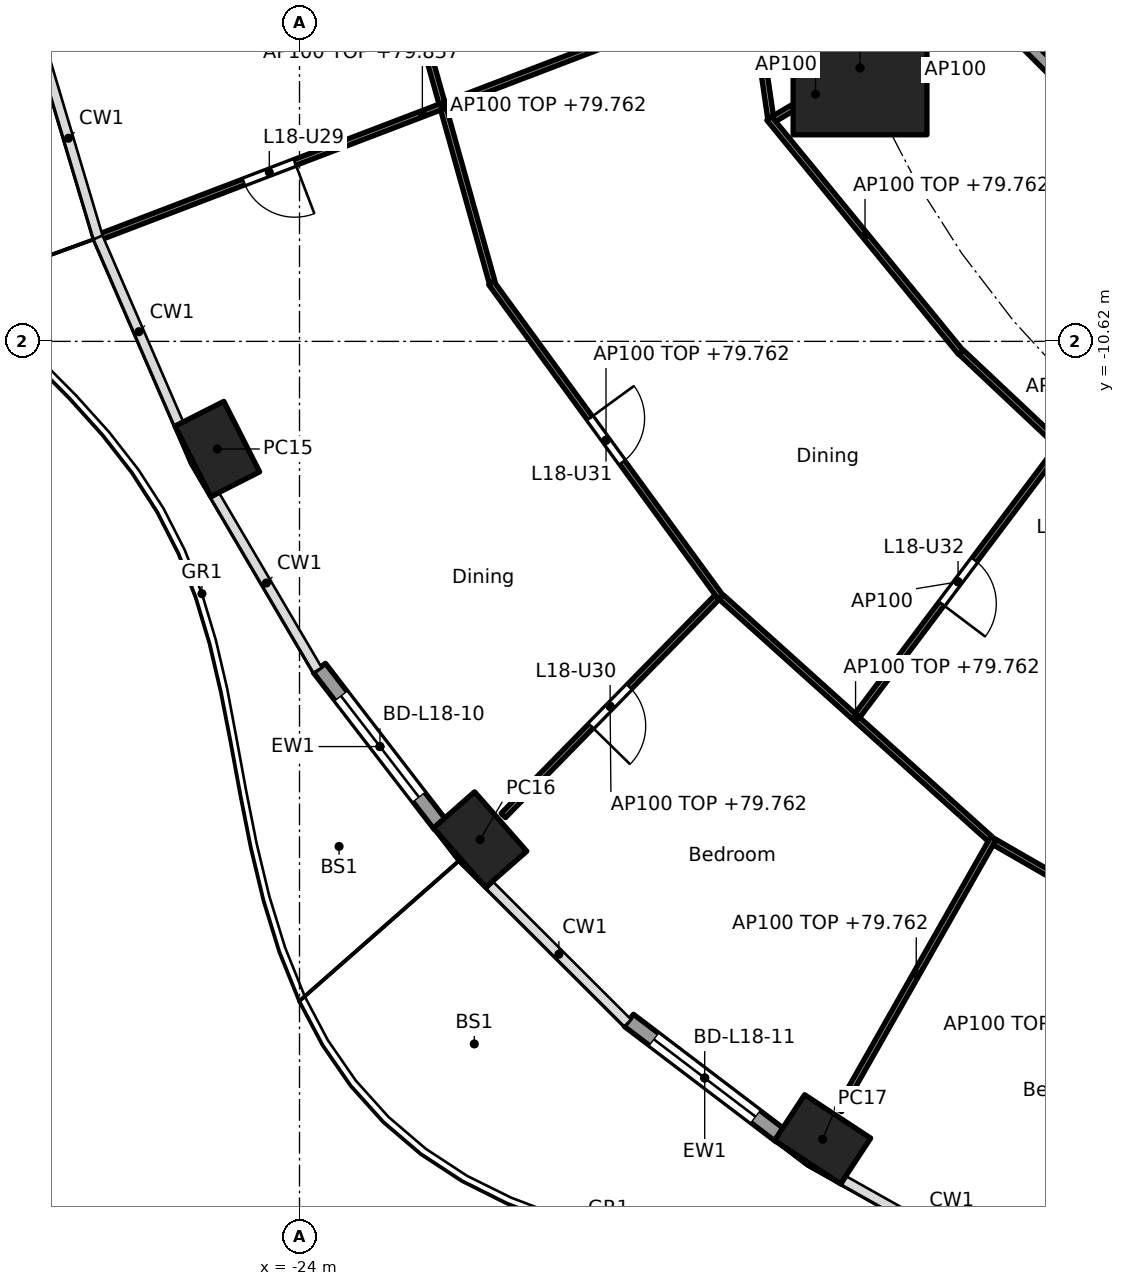
"""IFC4 building model, lengths in metres.
Left out: names, types, materials, properties, quantities, classifications, styles, units other than length and angle.
Written with IfcOpenShell. Run it as: python <this file> out.ifc"""

import sys

from ifc_helpers import new_model, si_unit, direction, frame, frame_2d, origin, origin_2d, place, context, subcontext, project, spatial, rectangle, hollow_rectangle, extrude, element, fill, save


model = new_model("IFC4")
c1 = context("Model", 3, precision=1e-05, world=origin(), true_north=direction((0.0, 1.0)))
c2 = subcontext(c1, "Body", "Model", "MODEL_VIEW")
j1 = project(units=[si_unit("LENGTHUNIT", "METRE"), si_unit("PLANEANGLEUNIT", "RADIAN")], contexts=[c1])
p1 = place(None, origin())
s1 = spatial("IfcSite", under=j1, at=p1, CompositionType="ELEMENT")
p2 = place(p1, origin())
s2 = spatial("IfcBuilding", under=s1, at=p2, CompositionType="ELEMENT")
p3 = place(p2, frame((0.0, 0.0, 77.0)))
s3 = spatial("IfcBuildingStorey", under=s2, at=p3, CompositionType="ELEMENT", Elevation=77.0)
for number, where, z_axis, x_axis in (
    (1, (-25.352, -12.39, 0.0), (0.0, 0.0, 1.0), (0.452, -0.892, 0.0)),
    (2, (-21.03, -18.813, 0.0), (0.0, 0.0, 1.0), (0.66, -0.751, 0.0)),
    (3, (-15.397, -23.742, 0.0), (0.0, 0.0, 1.0), (0.836, -0.549, 0.0)),
):
    element("IfcColumn", number, at=place(p3, frame(where, z_axis=z_axis, x_axis=x_axis)), inside=s3, PredefinedType="COLUMN", context=c2, shape_type="SweptSolid", body=[
        extrude(hollow_rectangle(XDim=1.3, YDim=0.9, WallThickness=0.045, at=origin_2d()), origin(), (0.0, 0.0, 1.0), 3.7),
    ])
p4 = place(p3, frame((-14.782, -6.123, 0.0), z_axis=(0.0, 0.0, 1.0), x_axis=(1.0, 0.0, 0.0)))
e4 = element("IfcColumn", 4, at=p4, inside=s3, PredefinedType="COLUMN", context=c2, shape_type="SweptSolid", body=[
    extrude(rectangle(XDim=2.2, YDim=2.2, at=origin_2d()), origin(), (0.0, 0.0, 1.0), 3.7),
])
p5 = place(p3, frame((-21.681, -18.576, 0.0), z_axis=(0.0, 0.0, 1.0), x_axis=(-0.61041202934, 0.792084057684, 0.0)))
e5 = element("IfcWall", 5, at=p5, inside=s3, PredefinedType="SOLIDWALL", context=c2, shape_type="SweptSolid", body=[
    extrude(rectangle(XDim=3.263, YDim=0.25, at=frame_2d((1.631, 0.0))), origin(), (0.0, 0.0, 1.0), 3.44),
])
p6 = place(p5, frame((0.582, 0.0, 0.0)))
e6 = element("IfcOpeningElement", 6, at=p6, cuts=e5, PredefinedType="OPENING", context=c2, shape_type="SweptSolid", body=[
    extrude(rectangle(XDim=2.1, YDim=2.4, at=frame_2d((1.05, 1.2))), frame((0.0, 0.135, 0.0), z_axis=(0.0, -1.0, 0.0), x_axis=(1.0, 0.0, 0.0)), (0.0, 0.0, 1.0), 0.27),
])
p7 = place(p3, frame((-16.089, -23.682, 0.0), z_axis=(0.0, 0.0, 1.0), x_axis=(-0.796037575978, 0.605247203736, 0.0)))
e7 = element("IfcWall", 7, at=p7, inside=s3, PredefinedType="SOLIDWALL", context=c2, shape_type="SweptSolid", body=[
    extrude(rectangle(XDim=3.134, YDim=0.25, at=frame_2d((1.567, 0.0))), origin(), (0.0, 0.0, 1.0), 3.44),
])
p8 = place(p7, frame((0.517, 0.0, 0.0)))
e8 = element("IfcOpeningElement", 8, at=p8, cuts=e7, PredefinedType="OPENING", context=c2, shape_type="SweptSolid", body=[
    extrude(rectangle(XDim=2.1, YDim=2.4, at=frame_2d((1.05, 1.2))), frame((0.0, 0.135, 0.0), z_axis=(0.0, -1.0, 0.0), x_axis=(1.0, 0.0, 0.0)), (0.0, 0.0, 1.0), 0.27),
])
p9 = place(p3, frame((-12.635, -5.134, 0.0), z_axis=(0.0, 0.0, 1.0), x_axis=(0.707106781187, -0.707106781187, 0.0)))
e9 = element("IfcWall", 9, at=p9, inside=s3, PredefinedType="PARTITIONING", context=c2, shape_type="SweptSolid", body=[
    extrude(rectangle(XDim=10.609, YDim=0.2, at=frame_2d((5.305, 0.0))), origin(), (0.0, 0.0, 1.0), 3.44),
])
p10 = place(p3, frame((-16.874, -2.677, 0.0), z_axis=(0.0, 0.0, 1.0), x_axis=(0.144260658133, -0.989539722555, 0.0)))
e10 = element("IfcWall", 10, at=p10, inside=s3, PredefinedType="PARTITIONING", context=c2, shape_type="SweptSolid", body=[
    extrude(rectangle(XDim=4.309, YDim=0.1, at=frame_2d((2.154, 0.0))), origin(), (0.0, 0.0, 1.0), 2.762),
])
p11 = place(p3, frame((-22.463, -3.832, 0.0), z_axis=(0.0, 0.0, 1.0), x_axis=(0.269797759333, -0.962917010473, 0.0)))
e11 = element("IfcWall", 11, at=p11, inside=s3, PredefinedType="PARTITIONING", context=c2, shape_type="SweptSolid", body=[
    extrude(rectangle(XDim=6.043, YDim=0.1, at=frame_2d((3.021, 0.0))), origin(), (0.0, 0.0, 1.0), 2.762),
])
p12 = place(p3, frame((-16.61, -4.826, 0.0), z_axis=(0.0, 0.0, 1.0), x_axis=(-0.934174502909, -0.356816476798, 0.0)))
e12 = element("IfcWall", 12, at=p12, inside=s3, PredefinedType="PARTITIONING", context=c2, shape_type="SweptSolid", body=[
    extrude(rectangle(XDim=11.496, YDim=0.1, at=frame_2d((5.748, 0.0))), origin(), (0.0, 0.0, 1.0), 2.837),
])
p13 = place(p12, frame((7.993, 0.0, 0.0)))
e13 = element("IfcOpeningElement", 13, at=p13, cuts=e12, PredefinedType="OPENING", context=c2, shape_type="SweptSolid", body=[
    extrude(rectangle(XDim=0.9, YDim=2.1, at=frame_2d((0.45, 1.05))), frame((0.0, 0.06, 0.0), z_axis=(0.0, -1.0, 0.0), x_axis=(1.0, 0.0, 0.0)), (0.0, 0.0, 1.0), 0.12),
])
p14 = place(p3, frame((-12.657, -5.243, 0.0), z_axis=(0.0, 0.0, 1.0), x_axis=(-0.923864733477, -0.382719158442, 0.0)))
e14 = element("IfcWall", 14, at=p14, inside=s3, PredefinedType="PARTITIONING", context=c2, shape_type="SweptSolid", body=[
    extrude(rectangle(XDim=2.25, YDim=0.1, at=frame_2d((1.125, 0.0))), origin(), (0.0, 0.0, 1.0), 3.44),
])
p15 = place(p3, frame((-14.825, -6.148, 0.0), z_axis=(0.0, 0.0, 1.0), x_axis=(-0.860452514841, -0.509530636669, 0.0)))
e15 = element("IfcWall", 15, at=p15, inside=s3, PredefinedType="PARTITIONING", context=c2, shape_type="SweptSolid", body=[
    extrude(rectangle(XDim=1.601, YDim=0.1, at=frame_2d((0.8, 0.0))), origin(), (0.0, 0.0, 1.0), 3.44),
])
p16 = place(p3, frame((-16.277, -6.951, 0.0), z_axis=(0.0, 0.0, 1.0), x_axis=(0.633427340372, -0.773802173988, 0.0)))
e16 = element("IfcWall", 16, at=p16, inside=s3, PredefinedType="PARTITIONING", context=c2, shape_type="SweptSolid", body=[
    extrude(rectangle(XDim=4.979, YDim=0.1, at=frame_2d((2.49, 0.0))), origin(), (0.0, 0.0, 1.0), 2.762),
])
p17 = place(p3, frame((-20.848, -9.658, 0.0), z_axis=(0.0, 0.0, 1.0), x_axis=(0.5895799361, -0.807710033953, 0.0)))
e17 = element("IfcWall", 17, at=p17, inside=s3, PredefinedType="PARTITIONING", context=c2, shape_type="SweptSolid", body=[
    extrude(rectangle(XDim=6.408, YDim=0.1, at=frame_2d((3.204, 0.0))), origin(), (0.0, 0.0, 1.0), 2.762),
])
p18 = place(p17, frame((2.754, 0.0, 0.0)))
e18 = element("IfcOpeningElement", 18, at=p18, cuts=e17, PredefinedType="OPENING", context=c2, shape_type="SweptSolid", body=[
    extrude(rectangle(XDim=0.9, YDim=2.1, at=frame_2d((0.45, 1.05))), frame((0.0, 0.06, 0.0), z_axis=(0.0, -1.0, 0.0), x_axis=(1.0, 0.0, 0.0)), (0.0, 0.0, 1.0), 0.12),
])
p19 = place(p3, frame((-13.118, -10.8, 0.0), z_axis=(0.0, 0.0, 1.0), x_axis=(0.72818280142, -0.685382964273, 0.0)))
e19 = element("IfcWall", 19, at=p19, inside=s3, PredefinedType="PARTITIONING", context=c2, shape_type="SweptSolid", body=[
    extrude(rectangle(XDim=4.586, YDim=0.1, at=frame_2d((2.293, 0.0))), origin(), (0.0, 0.0, 1.0), 2.762),
])
p20 = place(p19, frame((2.94, 0.0, 0.0)))
e20 = element("IfcOpeningElement", 20, at=p20, cuts=e19, PredefinedType="OPENING", context=c2, shape_type="SweptSolid", body=[
    extrude(rectangle(XDim=0.9, YDim=2.1, at=frame_2d((0.45, 1.05))), frame((0.0, 0.06, 0.0), z_axis=(0.0, -1.0, 0.0), x_axis=(1.0, 0.0, 0.0)), (0.0, 0.0, 1.0), 0.12),
])
p21 = place(p3, frame((-17.135, -14.829, 0.0), z_axis=(0.0, 0.0, 1.0), x_axis=(-0.699702869429, -0.714433967917, 0.0)))
e21 = element("IfcWall", 21, at=p21, inside=s3, PredefinedType="PARTITIONING", context=c2, shape_type="SweptSolid", body=[
    extrude(rectangle(XDim=5.022, YDim=0.1, at=frame_2d((2.511, 0.0))), origin(), (0.0, 0.0, 1.0), 2.762),
])
p22 = place(p21, frame((2.061, 0.0, 0.0)))
e22 = element("IfcOpeningElement", 22, at=p22, cuts=e21, PredefinedType="OPENING", context=c2, shape_type="SweptSolid", body=[
    extrude(rectangle(XDim=0.9, YDim=2.1, at=frame_2d((0.45, 1.05))), frame((0.0, 0.06, 0.0), z_axis=(0.0, -1.0, 0.0), x_axis=(1.0, 0.0, 0.0)), (0.0, 0.0, 1.0), 0.12),
])
p23 = place(p3, frame((-17.063, -14.827, 0.0), z_axis=(0.0, 0.0, 1.0), x_axis=(0.743478142868, -0.668760234373, 0.0)))
e23 = element("IfcWall", 23, at=p23, inside=s3, PredefinedType="PARTITIONING", context=c2, shape_type="SweptSolid", body=[
    extrude(rectangle(XDim=5.937, YDim=0.1, at=frame_2d((2.969, 0.0))), origin(), (0.0, 0.0, 1.0), 2.762),
])
p24 = place(p3, frame((-11.515, -12.377, 0.0), z_axis=(0.0, 0.0, 1.0), x_axis=(-0.60163860397, -0.798768420891, 0.0)))
e24 = element("IfcWall", 24, at=p24, inside=s3, PredefinedType="PARTITIONING", context=c2, shape_type="SweptSolid", body=[
    extrude(rectangle(XDim=5.502, YDim=0.1, at=frame_2d((2.751, 0.0))), origin(), (0.0, 0.0, 1.0), 3.44),
])
p25 = place(p24, frame((2.301, 0.0, 0.0)))
e25 = element("IfcOpeningElement", 25, at=p25, cuts=e24, PredefinedType="OPENING", context=c2, shape_type="SweptSolid", body=[
    extrude(rectangle(XDim=0.9, YDim=2.1, at=frame_2d((0.45, 1.05))), frame((0.0, 0.06, 0.0), z_axis=(0.0, -1.0, 0.0), x_axis=(1.0, 0.0, 0.0)), (0.0, 0.0, 1.0), 0.12),
])
p26 = place(p3, frame((-12.587, -18.787, 0.0), z_axis=(0.0, 0.0, 1.0), x_axis=(-0.493966211317, -0.869481099321, 0.0)))
e26 = element("IfcWall", 26, at=p26, inside=s3, PredefinedType="PARTITIONING", context=c2, shape_type="SweptSolid", body=[
    extrude(rectangle(XDim=5.146, YDim=0.1, at=frame_2d((2.573, 0.0))), origin(), (0.0, 0.0, 1.0), 2.762),
])
p27 = place(p3, frame((-12.568, -18.856, 0.0), z_axis=(0.0, 0.0, 1.0), x_axis=(0.866533437451, -0.499119025664, 0.0)))
e27 = element("IfcWall", 27, at=p27, inside=s3, PredefinedType="PARTITIONING", context=c2, shape_type="SweptSolid", body=[
    extrude(rectangle(XDim=5.535, YDim=0.1, at=frame_2d((2.768, 0.0))), origin(), (0.0, 0.0, 1.0), 2.762),
])
p28 = place(p27, frame((2.317, 0.0, 0.0)))
e28 = element("IfcOpeningElement", 28, at=p28, cuts=e27, PredefinedType="OPENING", context=c2, shape_type="SweptSolid", body=[
    extrude(rectangle(XDim=0.9, YDim=2.1, at=frame_2d((0.45, 1.05))), frame((0.0, 0.06, 0.0), z_axis=(0.0, -1.0, 0.0), x_axis=(1.0, 0.0, 0.0)), (0.0, 0.0, 1.0), 0.12),
])
p29 = place(p6, origin())
e29 = element("IfcDoor", 29, at=p29, inside=s3, OperationType="SLIDING_TO_LEFT", PredefinedType="DOOR", context=c2, shape_type="SweptSolid", body=[
    extrude(rectangle(XDim=2.1, YDim=2.4, at=frame_2d((1.05, 1.2))), frame((0.0, 0.025, 0.0), z_axis=(0.0, -1.0, 0.0), x_axis=(1.0, 0.0, 0.0)), (0.0, 0.0, 1.0), 0.05),
])
fill(e6, e29)
p30 = place(p8, origin())
e30 = element("IfcDoor", 30, at=p30, inside=s3, OperationType="SLIDING_TO_LEFT", PredefinedType="DOOR", context=c2, shape_type="SweptSolid", body=[
    extrude(rectangle(XDim=2.1, YDim=2.4, at=frame_2d((1.05, 1.2))), frame((0.0, 0.025, 0.0), z_axis=(0.0, -1.0, 0.0), x_axis=(1.0, 0.0, 0.0)), (0.0, 0.0, 1.0), 0.05),
])
fill(e8, e30)
p31 = place(p13, origin())
e31 = element("IfcDoor", 31, at=p31, inside=s3, OperationType="SINGLE_SWING_LEFT", PredefinedType="DOOR", context=c2, shape_type="SweptSolid", body=[
    extrude(rectangle(XDim=0.9, YDim=2.1, at=frame_2d((0.45, 1.05))), frame((0.0, 0.025, 0.0), z_axis=(0.0, -1.0, 0.0), x_axis=(1.0, 0.0, 0.0)), (0.0, 0.0, 1.0), 0.05),
])
fill(e13, e31)
p32 = place(p22, origin())
e32 = element("IfcDoor", 32, at=p32, inside=s3, OperationType="SINGLE_SWING_RIGHT", PredefinedType="DOOR", context=c2, shape_type="SweptSolid", body=[
    extrude(rectangle(XDim=0.9, YDim=2.1, at=frame_2d((0.45, 1.05))), frame((0.0, 0.025, 0.0), z_axis=(0.0, -1.0, 0.0), x_axis=(1.0, 0.0, 0.0)), (0.0, 0.0, 1.0), 0.05),
])
fill(e22, e32)
p33 = place(p18, origin())
e33 = element("IfcDoor", 33, at=p33, inside=s3, OperationType="SINGLE_SWING_LEFT", PredefinedType="DOOR", context=c2, shape_type="SweptSolid", body=[
    extrude(rectangle(XDim=0.9, YDim=2.1, at=frame_2d((0.45, 1.05))), frame((0.0, 0.025, 0.0), z_axis=(0.0, -1.0, 0.0), x_axis=(1.0, 0.0, 0.0)), (0.0, 0.0, 1.0), 0.05),
])
fill(e18, e33)
p34 = place(p25, origin())
e34 = element("IfcDoor", 34, at=p34, inside=s3, OperationType="SINGLE_SWING_RIGHT", PredefinedType="DOOR", context=c2, shape_type="SweptSolid", body=[
    extrude(rectangle(XDim=0.9, YDim=2.1, at=frame_2d((0.45, 1.05))), frame((0.0, 0.025, 0.0), z_axis=(0.0, -1.0, 0.0), x_axis=(1.0, 0.0, 0.0)), (0.0, 0.0, 1.0), 0.05),
])
fill(e25, e34)
save(model, sys.argv[1])
